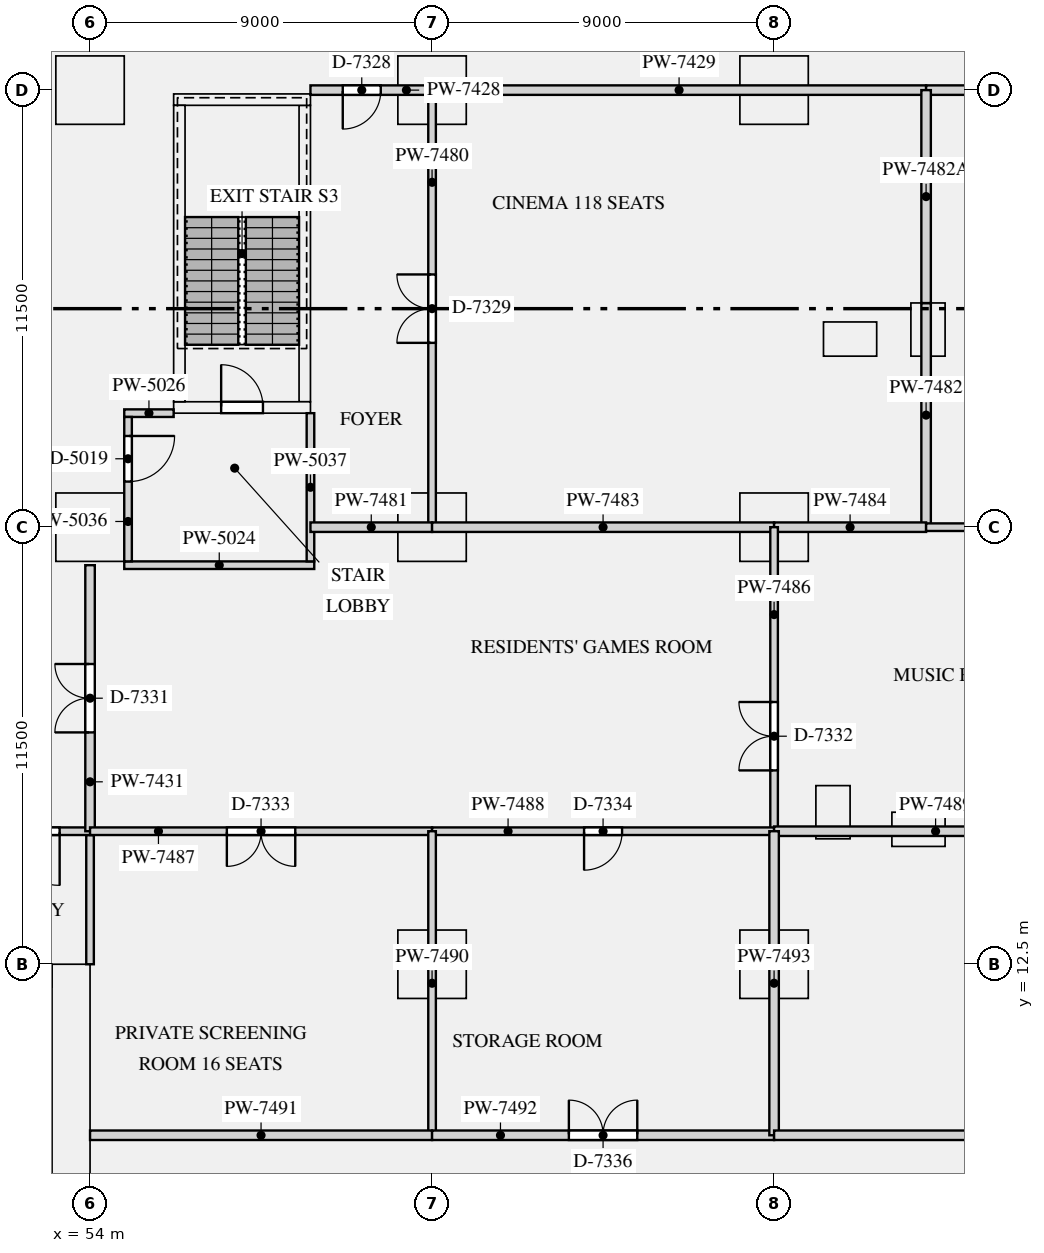
"""IFC4 building model, lengths in metres.
Left out: names, types, materials, properties, quantities, classifications, styles, units other than length and angle.
Written with IfcOpenShell. Run it as: python <this file> out.ifc"""

import sys

from ifc_helpers import new_model, si_unit, direction, frame, frame_2d, origin, origin_2d, place, context, subcontext, project, spatial, rectangle, extrude, element, fill, save


model = new_model("IFC4")
c1 = context("Model", 3, precision=1e-05, world=origin(), true_north=direction((0.0, 1.0)))
c2 = subcontext(c1, "Body", "Model", "MODEL_VIEW")
j1 = project(units=[si_unit("LENGTHUNIT", "METRE"), si_unit("PLANEANGLEUNIT", "RADIAN")], contexts=[c1])
p1 = place(None, origin())
s1 = spatial("IfcSite", under=j1, at=p1, CompositionType="ELEMENT")
p2 = place(p1, origin())
s2 = spatial("IfcBuilding", under=s1, at=p2, CompositionType="ELEMENT")
p3 = place(p2, frame((0.0, 0.0, 6.5)))
s3 = spatial("IfcBuildingStorey", under=s2, at=p3, CompositionType="ELEMENT", Elevation=6.5)
for number, where, z_axis, x_axis in (
    (1, (75.8, 16.05, 0.0), (0.0, 0.0, 1.0), (-1.0, 0.0, 0.0)),
    (2, (73.55, 16.5, 0.0), (0.0, 0.0, 1.0), (0.0, 1.0, 0.0)),
    (3, (74.0, 28.95, 0.0), (0.0, 0.0, 1.0), (1.0, 0.0, 0.0)),
    (4, (76.05, 29.2, 0.0), (0.0, 0.0, 1.0), (0.0, 1.0, 0.0)),
):
    element("IfcColumn", number, at=place(p3, frame(where, z_axis=z_axis, x_axis=x_axis)), inside=s3, PredefinedType="USERDEFINED", context=c2, shape_type="SweptSolid", body=[
        extrude(rectangle(XDim=1.4, YDim=0.9, at=origin_2d()), origin(), (0.0, 0.0, 1.0), 4.5),
    ])
for number, where, z_axis, x_axis in (
    (5, (54.0, 24.0, 0.0), (0.0, 0.0, 1.0), (1.0, 0.0, 0.0)),
    (6, (54.0, 35.5, 0.0), (0.0, 0.0, 1.0), (1.0, 0.0, 0.0)),
    (7, (63.0, 12.5, 0.0), (0.0, 0.0, 1.0), (1.0, 0.0, 0.0)),
    (8, (63.0, 24.0, 0.0), (0.0, 0.0, 1.0), (1.0, 0.0, 0.0)),
    (9, (63.0, 35.5, 0.0), (0.0, 0.0, 1.0), (1.0, 0.0, 0.0)),
    (10, (72.0, 12.5, 0.0), (0.0, 0.0, 1.0), (1.0, 0.0, 0.0)),
    (11, (72.0, 24.0, 0.0), (0.0, 0.0, 1.0), (1.0, 0.0, 0.0)),
    (12, (72.0, 35.5, 0.0), (0.0, 0.0, 1.0), (1.0, 0.0, 0.0)),
):
    element("IfcColumn", number, at=place(p3, frame(where, z_axis=z_axis, x_axis=x_axis)), inside=s3, PredefinedType="COLUMN", context=c2, shape_type="SweptSolid", body=[
        extrude(rectangle(XDim=1.8, YDim=1.8, at=origin_2d()), origin(), (0.0, 0.0, 1.0), 4.5),
    ])
p4 = place(p3, frame((53.5, 0.0, 0.0), z_axis=(0.0, 0.0, 1.0), x_axis=(0.0, 1.0, 0.0)))
e13 = element("IfcWall", 13, at=p4, inside=s3, PredefinedType="SHEAR", context=c2, shape_type="SweptSolid", body=[
    extrude(rectangle(XDim=12.5, YDim=1.0, at=frame_2d((6.25, 0.0))), origin(), (0.0, 0.0, 1.0), 4.5),
])
p5 = place(p3, frame((56.2, 27.15, 0.0), z_axis=(0.0, 0.0, 1.0), x_axis=(1.0, 0.0, 0.0)))
e14 = element("IfcWall", 14, at=p5, inside=s3, PredefinedType="SHEAR", context=c2, shape_type="SweptSolid", body=[
    extrude(rectangle(XDim=3.6, YDim=0.3, at=frame_2d((1.8, 0.0))), origin(), (0.0, 0.0, 1.0), 4.5),
])
p6 = place(p5, frame((1.25, 0.0, 0.0)))
e15 = element("IfcOpeningElement", 15, at=p6, cuts=e14, PredefinedType="OPENING", context=c2, shape_type="SweptSolid", body=[
    extrude(rectangle(XDim=1.1, YDim=2.1, at=frame_2d((0.55, 1.05))), frame((0.0, 0.16, 0.0), z_axis=(0.0, -1.0, 0.0), x_axis=(1.0, 0.0, 0.0)), (0.0, 0.0, 1.0), 0.32),
])
p7 = place(p3, frame((56.2, 35.25, 0.0), z_axis=(0.0, 0.0, 1.0), x_axis=(1.0, 0.0, 0.0)))
e16 = element("IfcWall", 16, at=p7, inside=s3, PredefinedType="SHEAR", context=c2, shape_type="SweptSolid", body=[
    extrude(rectangle(XDim=3.6, YDim=0.3, at=frame_2d((1.8, 0.0))), origin(), (0.0, 0.0, 1.0), 4.5),
])
for number, where, z_axis, x_axis in (
    (17, (56.35, 27.3, 0.0), (0.0, 0.0, 1.0), (0.0, 1.0, 0.0)),
    (18, (59.65, 27.3, 0.0), (0.0, 0.0, 1.0), (0.0, 1.0, 0.0)),
):
    element("IfcWall", number, at=place(p3, frame(where, z_axis=z_axis, x_axis=x_axis)), inside=s3, PredefinedType="SHEAR", context=c2, shape_type="SweptSolid", body=[
        extrude(rectangle(XDim=7.8, YDim=0.3, at=frame_2d((3.9, 0.0))), origin(), (0.0, 0.0, 1.0), 4.5),
    ])
p8 = place(p3, frame((54.9, 23.0, 0.0), z_axis=(0.0, 0.0, 1.0), x_axis=(1.0, 0.0, 0.0)))
e19 = element("IfcWall", 19, at=p8, inside=s3, PredefinedType="PARTITIONING", context=c2, shape_type="SweptSolid", body=[
    extrude(rectangle(XDim=5.0, YDim=0.2, at=frame_2d((2.5, 0.0))), origin(), (0.0, 0.0, 1.0), 4.098),
])
p9 = place(p3, frame((54.9, 27.0, 0.0), z_axis=(0.0, 0.0, 1.0), x_axis=(1.0, 0.0, 0.0)))
e20 = element("IfcWall", 20, at=p9, inside=s3, PredefinedType="PARTITIONING", context=c2, shape_type="SweptSolid", body=[
    extrude(rectangle(XDim=1.3, YDim=0.2, at=frame_2d((0.65, 0.0))), origin(), (0.0, 0.0, 1.0), 4.098),
])
p10 = place(p3, frame((54.0, 12.5, 0.0), z_axis=(0.0, 0.0, 1.0), x_axis=(0.0, 1.0, 0.0)))
e21 = element("IfcWall", 21, at=p10, inside=s3, PredefinedType="PARTITIONING", context=c2, shape_type="SweptSolid", body=[
    extrude(rectangle(XDim=3.4, YDim=0.2, at=frame_2d((1.7, 0.0))), origin(), (0.0, 0.0, 1.0), 4.098),
])
p11 = place(p3, frame((55.0, 23.1, 0.0), z_axis=(0.0, 0.0, 1.0), x_axis=(0.0, 1.0, 0.0)))
e22 = element("IfcWall", 22, at=p11, inside=s3, PredefinedType="PARTITIONING", context=c2, shape_type="SweptSolid", body=[
    extrude(rectangle(XDim=3.8, YDim=0.2, at=frame_2d((1.9, 0.0))), origin(), (0.0, 0.0, 1.0), 4.098),
])
p12 = place(p11, frame((2.1, 0.0, 0.0)))
e23 = element("IfcOpeningElement", 23, at=p12, cuts=e22, PredefinedType="OPENING", context=c2, shape_type="SweptSolid", body=[
    extrude(rectangle(XDim=1.2, YDim=2.1, at=frame_2d((0.6, 1.05))), frame((0.0, 0.11, 0.0), z_axis=(0.0, -1.0, 0.0), x_axis=(1.0, 0.0, 0.0)), (0.0, 0.0, 1.0), 0.22),
])
p13 = place(p3, frame((59.8, 23.1, 0.0), z_axis=(0.0, 0.0, 1.0), x_axis=(0.0, 1.0, 0.0)))
e24 = element("IfcWall", 24, at=p13, inside=s3, PredefinedType="PARTITIONING", context=c2, shape_type="SweptSolid", body=[
    extrude(rectangle(XDim=3.9, YDim=0.2, at=frame_2d((1.95, 0.0))), origin(), (0.0, 0.0, 1.0), 4.098),
])
p14 = place(p3, frame((17.9, 16.0, 0.0), z_axis=(0.0, 0.0, 1.0), x_axis=(1.0, 0.0, 0.0)))
e25 = element("IfcWall", 25, at=p14, inside=s3, PredefinedType="PARTITIONING", context=c2, shape_type="SweptSolid", body=[
    extrude(rectangle(XDim=36.2, YDim=0.2, at=frame_2d((18.1, 0.0))), origin(), (0.0, 0.0, 1.0), 4.098),
])
p15 = place(p14, frame((0.9, 0.0, 0.0)))
e26 = element("IfcOpeningElement", 26, at=p15, cuts=e25, PredefinedType="OPENING", context=c2, shape_type="SweptSolid", body=[
    extrude(rectangle(XDim=1.4, YDim=2.1, at=frame_2d((0.7, 1.05))), frame((0.0, 0.11, 0.0), z_axis=(0.0, -1.0, 0.0), x_axis=(1.0, 0.0, 0.0)), (0.0, 0.0, 1.0), 0.22),
])
p16 = place(p14, frame((33.9, 0.0, 0.0)))
e27 = element("IfcOpeningElement", 27, at=p16, cuts=e25, PredefinedType="OPENING", context=c2, shape_type="SweptSolid", body=[
    extrude(rectangle(XDim=1.4, YDim=2.1, at=frame_2d((0.7, 1.05))), frame((0.0, 0.11, 0.0), z_axis=(0.0, -1.0, 0.0), x_axis=(1.0, 0.0, 0.0)), (0.0, 0.0, 1.0), 0.22),
])
p17 = place(p3, frame((59.8, 35.5, 0.0), z_axis=(0.0, 0.0, 1.0), x_axis=(1.0, 0.0, 0.0)))
e28 = element("IfcWall", 28, at=p17, inside=s3, PredefinedType="PARTITIONING", context=c2, shape_type="SweptSolid", body=[
    extrude(rectangle(XDim=3.2, YDim=0.25, at=frame_2d((1.6, 0.0))), origin(), (0.0, 0.0, 1.0), 4.098),
])
p18 = place(p17, frame((0.85, 0.0, 0.0)))
e29 = element("IfcOpeningElement", 29, at=p18, cuts=e28, PredefinedType="OPENING", context=c2, shape_type="SweptSolid", body=[
    extrude(rectangle(XDim=1.0, YDim=2.1, at=frame_2d((0.5, 1.05))), frame((0.0, 0.135, 0.0), z_axis=(0.0, -1.0, 0.0), x_axis=(1.0, 0.0, 0.0)), (0.0, 0.0, 1.0), 0.27),
])
p19 = place(p3, frame((63.0, 35.5, 0.0), z_axis=(0.0, 0.0, 1.0), x_axis=(1.0, 0.0, 0.0)))
e30 = element("IfcWall", 30, at=p19, inside=s3, PredefinedType="PARTITIONING", context=c2, shape_type="SweptSolid", body=[
    extrude(rectangle(XDim=13.0, YDim=0.25, at=frame_2d((6.5, 0.0))), origin(), (0.0, 0.0, 1.0), 4.098),
])
p20 = place(p3, frame((76.0, 35.5, 0.0), z_axis=(0.0, 0.0, 1.0), x_axis=(1.0, 0.0, 0.0)))
e31 = element("IfcWall", 31, at=p20, inside=s3, PredefinedType="PARTITIONING", context=c2, shape_type="SweptSolid", body=[
    extrude(rectangle(XDim=14.0, YDim=0.25, at=frame_2d((7.0, 0.0))), origin(), (0.0, 0.0, 1.0), 4.098),
])
p21 = place(p20, frame((6.1, 0.0, 0.0)))
e32 = element("IfcOpeningElement", 32, at=p21, cuts=e31, PredefinedType="OPENING", context=c2, shape_type="SweptSolid", body=[
    extrude(rectangle(XDim=1.8, YDim=2.4, at=frame_2d((0.9, 1.2))), frame((0.0, 0.135, 0.0), z_axis=(0.0, -1.0, 0.0), x_axis=(1.0, 0.0, 0.0)), (0.0, 0.0, 1.0), 0.27),
])
p22 = place(p3, frame((54.0, 16.0, 0.0), z_axis=(0.0, 0.0, 1.0), x_axis=(0.0, 1.0, 0.0)))
e33 = element("IfcWall", 33, at=p22, inside=s3, PredefinedType="PARTITIONING", context=c2, shape_type="SweptSolid", body=[
    extrude(rectangle(XDim=7.0, YDim=0.25, at=frame_2d((3.5, 0.0))), origin(), (0.0, 0.0, 1.0), 4.098),
])
p23 = place(p22, frame((2.6, 0.0, 0.0)))
e34 = element("IfcOpeningElement", 34, at=p23, cuts=e33, PredefinedType="OPENING", context=c2, shape_type="SweptSolid", body=[
    extrude(rectangle(XDim=1.8, YDim=2.4, at=frame_2d((0.9, 1.2))), frame((0.0, 0.135, 0.0), z_axis=(0.0, -1.0, 0.0), x_axis=(1.0, 0.0, 0.0)), (0.0, 0.0, 1.0), 0.27),
])
p24 = place(p3, frame((63.0, 24.0, 0.0), z_axis=(0.0, 0.0, 1.0), x_axis=(0.0, 1.0, 0.0)))
e35 = element("IfcWall", 35, at=p24, inside=s3, PredefinedType="PARTITIONING", context=c2, shape_type="SweptSolid", body=[
    extrude(rectangle(XDim=11.5, YDim=0.2, at=frame_2d((5.75, 0.0))), origin(), (0.0, 0.0, 1.0), 4.098),
])
p25 = place(p24, frame((4.85, 0.0, 0.0)))
e36 = element("IfcOpeningElement", 36, at=p25, cuts=e35, PredefinedType="OPENING", context=c2, shape_type="SweptSolid", body=[
    extrude(rectangle(XDim=1.8, YDim=2.4, at=frame_2d((0.9, 1.2))), frame((0.0, 0.11, 0.0), z_axis=(0.0, -1.0, 0.0), x_axis=(1.0, 0.0, 0.0)), (0.0, 0.0, 1.0), 0.22),
])
p26 = place(p3, frame((59.8, 24.0, 0.0), z_axis=(0.0, 0.0, 1.0), x_axis=(1.0, 0.0, 0.0)))
e37 = element("IfcWall", 37, at=p26, inside=s3, PredefinedType="PARTITIONING", context=c2, shape_type="SweptSolid", body=[
    extrude(rectangle(XDim=3.2, YDim=0.25, at=frame_2d((1.6, 0.0))), origin(), (0.0, 0.0, 1.0), 4.098),
])
p27 = place(p3, frame((76.0, 24.0, 0.0), z_axis=(0.0, 0.0, 1.0), x_axis=(0.0, 1.0, 0.0)))
e38 = element("IfcWall", 38, at=p27, inside=s3, PredefinedType="PARTITIONING", context=c2, shape_type="SweptSolid", body=[
    extrude(rectangle(XDim=5.897, YDim=0.25, at=frame_2d((2.948, 0.0))), origin(), (0.0, 0.0, 1.0), 4.098),
])
p28 = place(p3, frame((76.0, 29.897, 0.0), z_axis=(0.0, 0.0, 1.0), x_axis=(0.0, 1.0, 0.0)))
e39 = element("IfcWall", 39, at=p28, inside=s3, PredefinedType="PARTITIONING", context=c2, shape_type="SweptSolid", body=[
    extrude(rectangle(XDim=5.603, YDim=0.25, at=frame_2d((2.802, 0.0))), origin(), (0.0, 0.0, 1.0), 3.148),
])
p29 = place(p3, frame((63.0, 24.0, 0.0), z_axis=(0.0, 0.0, 1.0), x_axis=(1.0, 0.0, 0.0)))
e40 = element("IfcWall", 40, at=p29, inside=s3, PredefinedType="PARTITIONING", context=c2, shape_type="SweptSolid", body=[
    extrude(rectangle(XDim=9.0, YDim=0.25, at=frame_2d((4.5, 0.0))), origin(), (0.0, 0.0, 1.0), 4.098),
])
p30 = place(p3, frame((72.0, 24.0, 0.0), z_axis=(0.0, 0.0, 1.0), x_axis=(1.0, 0.0, 0.0)))
e41 = element("IfcWall", 41, at=p30, inside=s3, PredefinedType="PARTITIONING", context=c2, shape_type="SweptSolid", body=[
    extrude(rectangle(XDim=4.0, YDim=0.25, at=frame_2d((2.0, 0.0))), origin(), (0.0, 0.0, 1.0), 4.098),
])
p31 = place(p3, frame((76.0, 24.0, 0.0), z_axis=(0.0, 0.0, 1.0), x_axis=(1.0, 0.0, 0.0)))
e42 = element("IfcWall", 42, at=p31, inside=s3, PredefinedType="PARTITIONING", context=c2, shape_type="SweptSolid", body=[
    extrude(rectangle(XDim=14.0, YDim=0.2, at=frame_2d((7.0, 0.0))), origin(), (0.0, 0.0, 1.0), 4.098),
])
p32 = place(p3, frame((72.0, 16.0, 0.0), z_axis=(0.0, 0.0, 1.0), x_axis=(0.0, 1.0, 0.0)))
e43 = element("IfcWall", 43, at=p32, inside=s3, PredefinedType="PARTITIONING", context=c2, shape_type="SweptSolid", body=[
    extrude(rectangle(XDim=8.0, YDim=0.2, at=frame_2d((4.0, 0.0))), origin(), (0.0, 0.0, 1.0), 4.098),
])
p33 = place(p32, frame((1.6, 0.0, 0.0)))
e44 = element("IfcOpeningElement", 44, at=p33, cuts=e43, PredefinedType="OPENING", context=c2, shape_type="SweptSolid", body=[
    extrude(rectangle(XDim=1.8, YDim=2.4, at=frame_2d((0.9, 1.2))), frame((0.0, 0.11, 0.0), z_axis=(0.0, -1.0, 0.0), x_axis=(1.0, 0.0, 0.0)), (0.0, 0.0, 1.0), 0.22),
])
p34 = place(p3, frame((54.0, 16.0, 0.0), z_axis=(0.0, 0.0, 1.0), x_axis=(1.0, 0.0, 0.0)))
e45 = element("IfcWall", 45, at=p34, inside=s3, PredefinedType="PARTITIONING", context=c2, shape_type="SweptSolid", body=[
    extrude(rectangle(XDim=9.0, YDim=0.2, at=frame_2d((4.5, 0.0))), origin(), (0.0, 0.0, 1.0), 4.098),
])
p35 = place(p34, frame((3.6, 0.0, 0.0)))
e46 = element("IfcOpeningElement", 46, at=p35, cuts=e45, PredefinedType="OPENING", context=c2, shape_type="SweptSolid", body=[
    extrude(rectangle(XDim=1.8, YDim=2.4, at=frame_2d((0.9, 1.2))), frame((0.0, 0.11, 0.0), z_axis=(0.0, -1.0, 0.0), x_axis=(1.0, 0.0, 0.0)), (0.0, 0.0, 1.0), 0.22),
])
p36 = place(p3, frame((63.0, 16.0, 0.0), z_axis=(0.0, 0.0, 1.0), x_axis=(1.0, 0.0, 0.0)))
e47 = element("IfcWall", 47, at=p36, inside=s3, PredefinedType="PARTITIONING", context=c2, shape_type="SweptSolid", body=[
    extrude(rectangle(XDim=9.0, YDim=0.2, at=frame_2d((4.5, 0.0))), origin(), (0.0, 0.0, 1.0), 4.098),
])
p37 = place(p36, frame((4.0, 0.0, 0.0)))
e48 = element("IfcOpeningElement", 48, at=p37, cuts=e47, PredefinedType="OPENING", context=c2, shape_type="SweptSolid", body=[
    extrude(rectangle(XDim=1.0, YDim=2.1, at=frame_2d((0.5, 1.05))), frame((0.0, 0.11, 0.0), z_axis=(0.0, -1.0, 0.0), x_axis=(1.0, 0.0, 0.0)), (0.0, 0.0, 1.0), 0.22),
])
p38 = place(p3, frame((72.0, 16.0, 0.0), z_axis=(0.0, 0.0, 1.0), x_axis=(1.0, 0.0, 0.0)))
e49 = element("IfcWall", 49, at=p38, inside=s3, PredefinedType="PARTITIONING", context=c2, shape_type="SweptSolid", body=[
    extrude(rectangle(XDim=18.0, YDim=0.25, at=frame_2d((9.0, 0.0))), origin(), (0.0, 0.0, 1.0), 4.098),
])
p39 = place(p38, frame((8.5, 0.0, 0.0)))
e50 = element("IfcOpeningElement", 50, at=p39, cuts=e49, PredefinedType="OPENING", context=c2, shape_type="SweptSolid", body=[
    extrude(rectangle(XDim=1.0, YDim=2.1, at=frame_2d((0.5, 1.05))), frame((0.0, 0.135, 0.0), z_axis=(0.0, -1.0, 0.0), x_axis=(1.0, 0.0, 0.0)), (0.0, 0.0, 1.0), 0.27),
])
p40 = place(p3, frame((63.0, 8.0, 0.0), z_axis=(0.0, 0.0, 1.0), x_axis=(0.0, 1.0, 0.0)))
e51 = element("IfcWall", 51, at=p40, inside=s3, PredefinedType="PARTITIONING", context=c2, shape_type="SweptSolid", body=[
    extrude(rectangle(XDim=8.0, YDim=0.2, at=frame_2d((4.0, 0.0))), origin(), (0.0, 0.0, 1.0), 4.098),
])
p41 = place(p3, frame((54.0, 8.0, 0.0), z_axis=(0.0, 0.0, 1.0), x_axis=(1.0, 0.0, 0.0)))
e52 = element("IfcWall", 52, at=p41, inside=s3, PredefinedType="PARTITIONING", context=c2, shape_type="SweptSolid", body=[
    extrude(rectangle(XDim=9.0, YDim=0.25, at=frame_2d((4.5, 0.0))), origin(), (0.0, 0.0, 1.0), 4.098),
])
p42 = place(p3, frame((63.0, 8.0, 0.0), z_axis=(0.0, 0.0, 1.0), x_axis=(1.0, 0.0, 0.0)))
e53 = element("IfcWall", 53, at=p42, inside=s3, PredefinedType="PARTITIONING", context=c2, shape_type="SweptSolid", body=[
    extrude(rectangle(XDim=9.0, YDim=0.25, at=frame_2d((4.5, 0.0))), origin(), (0.0, 0.0, 1.0), 4.098),
])
p43 = place(p42, frame((3.6, 0.0, 0.0)))
e54 = element("IfcOpeningElement", 54, at=p43, cuts=e53, PredefinedType="OPENING", context=c2, shape_type="SweptSolid", body=[
    extrude(rectangle(XDim=1.8, YDim=2.4, at=frame_2d((0.9, 1.2))), frame((0.0, 0.135, 0.0), z_axis=(0.0, -1.0, 0.0), x_axis=(1.0, 0.0, 0.0)), (0.0, 0.0, 1.0), 0.27),
])
p44 = place(p3, frame((72.0, 8.0, 0.0), z_axis=(0.0, 0.0, 1.0), x_axis=(0.0, 1.0, 0.0)))
e55 = element("IfcWall", 55, at=p44, inside=s3, PredefinedType="PARTITIONING", context=c2, shape_type="SweptSolid", body=[
    extrude(rectangle(XDim=8.0, YDim=0.25, at=frame_2d((4.0, 0.0))), origin(), (0.0, 0.0, 1.0), 4.098),
])
p45 = place(p3, frame((72.0, 8.0, 0.0), z_axis=(0.0, 0.0, 1.0), x_axis=(1.0, 0.0, 0.0)))
e56 = element("IfcWall", 56, at=p45, inside=s3, PredefinedType="PARTITIONING", context=c2, shape_type="SweptSolid", body=[
    extrude(rectangle(XDim=18.0, YDim=0.25, at=frame_2d((9.0, 0.0))), origin(), (0.0, 0.0, 1.0), 4.098),
])
p46 = place(p6, origin())
e57 = element("IfcDoor", 57, at=p46, inside=s3, OperationType="SINGLE_SWING_LEFT", PredefinedType="DOOR", context=c2, shape_type="SweptSolid", body=[
    extrude(rectangle(XDim=1.1, YDim=2.1, at=frame_2d((0.55, 1.05))), frame((0.0, 0.025, 0.0), z_axis=(0.0, -1.0, 0.0), x_axis=(1.0, 0.0, 0.0)), (0.0, 0.0, 1.0), 0.05),
])
fill(e15, e57)
p47 = place(p12, frame((1.2, 0.0, 0.0), z_axis=(0.0, 0.0, 1.0), x_axis=(-1.0, 0.0, 0.0)))
e58 = element("IfcDoor", 58, at=p47, inside=s3, OperationType="SINGLE_SWING_LEFT", PredefinedType="DOOR", context=c2, shape_type="SweptSolid", body=[
    extrude(rectangle(XDim=1.2, YDim=2.1, at=frame_2d((0.6, 1.05))), frame((0.0, 0.025, 0.0), z_axis=(0.0, -1.0, 0.0), x_axis=(1.0, 0.0, 0.0)), (0.0, 0.0, 1.0), 0.05),
])
fill(e23, e58)
p48 = place(p16, frame((1.4, 0.0, 0.0), z_axis=(0.0, 0.0, 1.0), x_axis=(-1.0, 0.0, 0.0)))
e59 = element("IfcDoor", 59, at=p48, inside=s3, OperationType="SINGLE_SWING_LEFT", PredefinedType="DOOR", context=c2, shape_type="SweptSolid", body=[
    extrude(rectangle(XDim=1.4, YDim=2.1, at=frame_2d((0.7, 1.05))), frame((0.0, 0.025, 0.0), z_axis=(0.0, -1.0, 0.0), x_axis=(1.0, 0.0, 0.0)), (0.0, 0.0, 1.0), 0.05),
])
fill(e27, e59)
p49 = place(p18, frame((1.0, 0.0, 0.0), z_axis=(0.0, 0.0, 1.0), x_axis=(-1.0, 0.0, 0.0)))
e60 = element("IfcDoor", 60, at=p49, inside=s3, OperationType="SINGLE_SWING_RIGHT", PredefinedType="DOOR", context=c2, shape_type="SweptSolid", body=[
    extrude(rectangle(XDim=1.0, YDim=2.1, at=frame_2d((0.5, 1.05))), frame((0.0, 0.025, 0.0), z_axis=(0.0, -1.0, 0.0), x_axis=(1.0, 0.0, 0.0)), (0.0, 0.0, 1.0), 0.05),
])
fill(e29, e60)
p50 = place(p25, origin())
e61 = element("IfcDoor", 61, at=p50, inside=s3, OperationType="DOUBLE_DOOR_SINGLE_SWING", PredefinedType="DOOR", context=c2, shape_type="SweptSolid", body=[
    extrude(rectangle(XDim=1.8, YDim=2.4, at=frame_2d((0.9, 1.2))), frame((0.0, 0.025, 0.0), z_axis=(0.0, -1.0, 0.0), x_axis=(1.0, 0.0, 0.0)), (0.0, 0.0, 1.0), 0.05),
])
fill(e36, e61)
p51 = place(p23, origin())
e62 = element("IfcDoor", 62, at=p51, inside=s3, OperationType="DOUBLE_DOOR_SINGLE_SWING", PredefinedType="DOOR", context=c2, shape_type="SweptSolid", body=[
    extrude(rectangle(XDim=1.8, YDim=2.4, at=frame_2d((0.9, 1.2))), frame((0.0, 0.025, 0.0), z_axis=(0.0, -1.0, 0.0), x_axis=(1.0, 0.0, 0.0)), (0.0, 0.0, 1.0), 0.05),
])
fill(e34, e62)
p52 = place(p33, origin())
e63 = element("IfcDoor", 63, at=p52, inside=s3, OperationType="DOUBLE_DOOR_SINGLE_SWING", PredefinedType="DOOR", context=c2, shape_type="SweptSolid", body=[
    extrude(rectangle(XDim=1.8, YDim=2.4, at=frame_2d((0.9, 1.2))), frame((0.0, 0.025, 0.0), z_axis=(0.0, -1.0, 0.0), x_axis=(1.0, 0.0, 0.0)), (0.0, 0.0, 1.0), 0.05),
])
fill(e44, e63)
p53 = place(p35, frame((1.8, 0.0, 0.0), z_axis=(0.0, 0.0, 1.0), x_axis=(-1.0, 0.0, 0.0)))
e64 = element("IfcDoor", 64, at=p53, inside=s3, OperationType="DOUBLE_DOOR_SINGLE_SWING", PredefinedType="DOOR", context=c2, shape_type="SweptSolid", body=[
    extrude(rectangle(XDim=1.8, YDim=2.4, at=frame_2d((0.9, 1.2))), frame((0.0, 0.025, 0.0), z_axis=(0.0, -1.0, 0.0), x_axis=(1.0, 0.0, 0.0)), (0.0, 0.0, 1.0), 0.05),
])
fill(e46, e64)
p54 = place(p37, frame((1.0, 0.0, 0.0), z_axis=(0.0, 0.0, 1.0), x_axis=(-1.0, 0.0, 0.0)))
e65 = element("IfcDoor", 65, at=p54, inside=s3, OperationType="SINGLE_SWING_RIGHT", PredefinedType="DOOR", context=c2, shape_type="SweptSolid", body=[
    extrude(rectangle(XDim=1.0, YDim=2.1, at=frame_2d((0.5, 1.05))), frame((0.0, 0.025, 0.0), z_axis=(0.0, -1.0, 0.0), x_axis=(1.0, 0.0, 0.0)), (0.0, 0.0, 1.0), 0.05),
])
fill(e48, e65)
p55 = place(p43, origin())
e66 = element("IfcDoor", 66, at=p55, inside=s3, OperationType="DOUBLE_DOOR_SINGLE_SWING", PredefinedType="DOOR", context=c2, shape_type="SweptSolid", body=[
    extrude(rectangle(XDim=1.8, YDim=2.4, at=frame_2d((0.9, 1.2))), frame((0.0, 0.025, 0.0), z_axis=(0.0, -1.0, 0.0), x_axis=(1.0, 0.0, 0.0)), (0.0, 0.0, 1.0), 0.05),
])
fill(e54, e66)
save(model, sys.argv[1])
